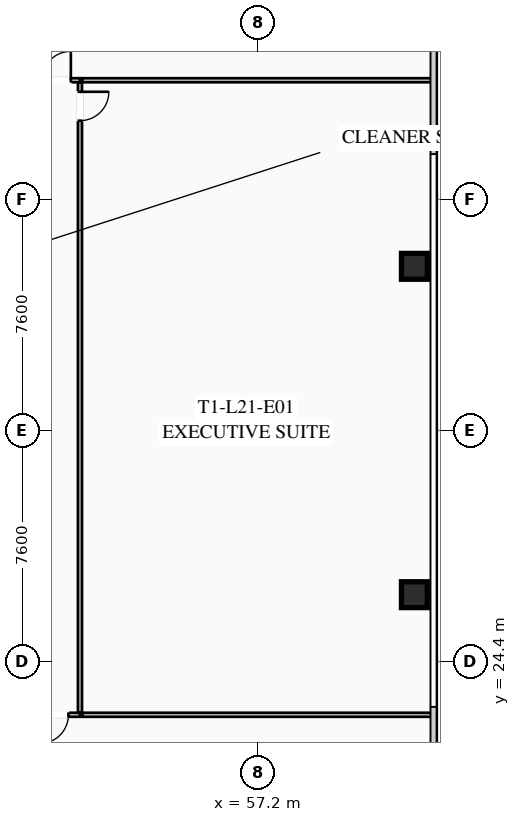
"""IFC4 building model, lengths in metres.
Left out: names, types, materials, properties, quantities, classifications, styles, units other than length and angle.
Written with IfcOpenShell. Run it as: python <this file> out.ifc"""

import sys

from ifc_helpers import new_model, si_unit, direction, frame, frame_2d, origin, origin_2d, place, context, subcontext, project, spatial, rectangle, hollow_rectangle, extrude, element, fill, save


model = new_model("IFC4")
c1 = context("Model", 3, precision=1e-05, world=origin(), true_north=direction((0.0, 1.0)))
c2 = subcontext(c1, "Body", "Model", "MODEL_VIEW")
j1 = project(units=[si_unit("LENGTHUNIT", "METRE"), si_unit("PLANEANGLEUNIT", "RADIAN")], contexts=[c1])
p1 = place(None, origin())
s1 = spatial("IfcSite", under=j1, at=p1, CompositionType="ELEMENT")
p2 = place(p1, origin())
s2 = spatial("IfcBuilding", under=s1, at=p2, CompositionType="ELEMENT")
p3 = place(p2, frame((0.0, 0.0, 81.4)))
s3 = spatial("IfcBuildingStorey", under=s2, at=p3, CompositionType="ELEMENT", Elevation=81.4)
for number, where, z_axis, x_axis in (
    (1, (62.35, 26.6, 0.0), (0.0, 0.0, 1.0), (1.0, 0.0, 0.0)),
    (2, (62.35, 37.4, 0.0), (0.0, 0.0, 1.0), (1.0, 0.0, 0.0)),
):
    element("IfcColumn", number, at=place(p3, frame(where, z_axis=z_axis, x_axis=x_axis)), inside=s3, PredefinedType="COLUMN", context=c2, shape_type="SweptSolid", body=[
        extrude(hollow_rectangle(XDim=0.85, YDim=0.85, WallThickness=0.035, at=origin_2d()), origin(), (0.0, 0.0, 1.0), 3.35),
    ])
p4 = place(p3, frame((24.05, 43.52, 0.0), z_axis=(0.0, 0.0, 1.0), x_axis=(1.0, 0.0, 0.0)))
e3 = element("IfcWall", 3, at=p4, inside=s3, PredefinedType="PARTITIONING", context=c2, shape_type="SweptSolid", body=[
    extrude(rectangle(XDim=27.3, YDim=0.135, at=frame_2d((13.65, 0.0))), origin(), (0.0, 0.0, 1.0), 2.703),
])
p5 = place(p4, frame((0.3, 0.0, 0.0)))
e4 = element("IfcOpeningElement", 4, at=p5, cuts=e3, PredefinedType="OPENING", context=c2, shape_type="SweptSolid", body=[
    extrude(rectangle(XDim=0.95, YDim=2.05, at=frame_2d((0.475, 1.025))), frame((0.0, 0.077, 0.0), z_axis=(0.0, -1.0, 0.0), x_axis=(1.0, 0.0, 0.0)), (0.0, 0.0, 1.0), 0.155),
])
p6 = place(p4, frame((17.732, 0.0, 0.0)))
e5 = element("IfcOpeningElement", 5, at=p6, cuts=e3, PredefinedType="OPENING", context=c2, shape_type="SweptSolid", body=[
    extrude(rectangle(XDim=0.95, YDim=2.05, at=frame_2d((0.475, 1.025))), frame((0.0, 0.077, 0.0), z_axis=(0.0, -1.0, 0.0), x_axis=(1.0, 0.0, 0.0)), (0.0, 0.0, 1.0), 0.155),
])
p7 = place(p4, frame((26.05, 0.0, 0.0)))
e6 = element("IfcOpeningElement", 6, at=p7, cuts=e3, PredefinedType="OPENING", context=c2, shape_type="SweptSolid", body=[
    extrude(rectangle(XDim=0.95, YDim=2.05, at=frame_2d((0.475, 1.025))), frame((0.0, 0.077, 0.0), z_axis=(0.0, -1.0, 0.0), x_axis=(1.0, 0.0, 0.0)), (0.0, 0.0, 1.0), 0.155),
])
p8 = place(p3, frame((51.35, 22.65, 0.0), z_axis=(0.0, 0.0, 1.0), x_axis=(-1.0, 0.0, 0.0)))
e7 = element("IfcWall", 7, at=p8, inside=s3, PredefinedType="PARTITIONING", context=c2, shape_type="SweptSolid", body=[
    extrude(rectangle(XDim=27.3, YDim=0.135, at=frame_2d((13.65, 0.0))), origin(), (0.0, 0.0, 1.0), 2.703),
])
p9 = place(p8, frame((25.97, 0.0, 0.0)))
e8 = element("IfcOpeningElement", 8, at=p9, cuts=e7, PredefinedType="OPENING", context=c2, shape_type="SweptSolid", body=[
    extrude(rectangle(XDim=0.95, YDim=2.05, at=frame_2d((0.475, 1.025))), frame((0.0, 0.077, 0.0), z_axis=(0.0, -1.0, 0.0), x_axis=(1.0, 0.0, 0.0)), (0.0, 0.0, 1.0), 0.155),
])
p10 = place(p8, frame((12.79, 0.0, 0.0)))
e9 = element("IfcOpeningElement", 9, at=p10, cuts=e7, PredefinedType="OPENING", context=c2, shape_type="SweptSolid", body=[
    extrude(rectangle(XDim=0.95, YDim=2.05, at=frame_2d((0.475, 1.025))), frame((0.0, 0.077, 0.0), z_axis=(0.0, -1.0, 0.0), x_axis=(1.0, 0.0, 0.0)), (0.0, 0.0, 1.0), 0.155),
])
p11 = place(p8, frame((8.798, 0.0, 0.0)))
e10 = element("IfcOpeningElement", 10, at=p11, cuts=e7, PredefinedType="OPENING", context=c2, shape_type="SweptSolid", body=[
    extrude(rectangle(XDim=0.95, YDim=2.05, at=frame_2d((0.475, 1.025))), frame((0.0, 0.077, 0.0), z_axis=(0.0, -1.0, 0.0), x_axis=(1.0, 0.0, 0.0)), (0.0, 0.0, 1.0), 0.155),
])
p12 = place(p8, frame((0.38, 0.0, 0.0)))
e11 = element("IfcOpeningElement", 11, at=p12, cuts=e7, PredefinedType="OPENING", context=c2, shape_type="SweptSolid", body=[
    extrude(rectangle(XDim=0.95, YDim=2.05, at=frame_2d((0.475, 1.025))), frame((0.0, 0.077, 0.0), z_axis=(0.0, -1.0, 0.0), x_axis=(1.0, 0.0, 0.0)), (0.0, 0.0, 1.0), 0.155),
])
p13 = place(p3, frame((51.35, 43.44, 0.0), z_axis=(0.0, 0.0, 1.0), x_axis=(0.0, -1.0, 0.0)))
e12 = element("IfcWall", 12, at=p13, inside=s3, PredefinedType="PARTITIONING", context=c2, shape_type="SweptSolid", body=[
    extrude(rectangle(XDim=20.71, YDim=0.135, at=frame_2d((10.355, 0.0))), origin(), (0.0, 0.0, 1.0), 2.703),
])
p14 = place(p13, frame((0.3, 0.0, 0.0)))
e13 = element("IfcOpeningElement", 13, at=p14, cuts=e12, PredefinedType="OPENING", context=c2, shape_type="SweptSolid", body=[
    extrude(rectangle(XDim=0.95, YDim=2.05, at=frame_2d((0.475, 1.025))), frame((0.0, 0.077, 0.0), z_axis=(0.0, -1.0, 0.0), x_axis=(1.0, 0.0, 0.0)), (0.0, 0.0, 1.0), 0.155),
])
for number, where, z_axis, x_axis in (
    (14, (62.98, 43.52, 0.0), (0.0, 0.0, 1.0), (-1.0, 0.0, 0.0)),
    (15, (51.43, 22.65, 0.0), (0.0, 0.0, 1.0), (1.0, 0.0, 0.0)),
):
    element("IfcWall", number, at=place(p3, frame(where, z_axis=z_axis, x_axis=x_axis)), inside=s3, PredefinedType="PARTITIONING", context=c2, shape_type="SweptSolid", body=[
        extrude(rectangle(XDim=11.55, YDim=0.135, at=frame_2d((5.775, 0.0))), origin(), (0.0, 0.0, 1.0), 2.703),
    ])
p15 = place(p7, origin())
e16 = element("IfcDoor", 16, at=p15, inside=s3, OperationType="SINGLE_SWING_RIGHT", PredefinedType="DOOR", context=c2, shape_type="SweptSolid", body=[
    extrude(rectangle(XDim=0.95, YDim=2.05, at=frame_2d((0.475, 1.025))), frame((0.0, 0.025, 0.0), z_axis=(0.0, -1.0, 0.0), x_axis=(1.0, 0.0, 0.0)), (0.0, 0.0, 1.0), 0.05),
])
fill(e6, e16)
p16 = place(p12, origin())
e17 = element("IfcDoor", 17, at=p16, inside=s3, OperationType="SINGLE_SWING_RIGHT", PredefinedType="DOOR", context=c2, shape_type="SweptSolid", body=[
    extrude(rectangle(XDim=0.95, YDim=2.05, at=frame_2d((0.475, 1.025))), frame((0.0, 0.025, 0.0), z_axis=(0.0, -1.0, 0.0), x_axis=(1.0, 0.0, 0.0)), (0.0, 0.0, 1.0), 0.05),
])
fill(e11, e17)
p17 = place(p14, origin())
e18 = element("IfcDoor", 18, at=p17, inside=s3, OperationType="SINGLE_SWING_LEFT", PredefinedType="DOOR", context=c2, shape_type="SweptSolid", body=[
    extrude(rectangle(XDim=0.95, YDim=2.05, at=frame_2d((0.475, 1.025))), frame((0.0, 0.025, 0.0), z_axis=(0.0, -1.0, 0.0), x_axis=(1.0, 0.0, 0.0)), (0.0, 0.0, 1.0), 0.05),
])
fill(e13, e18)
save(model, sys.argv[1])
